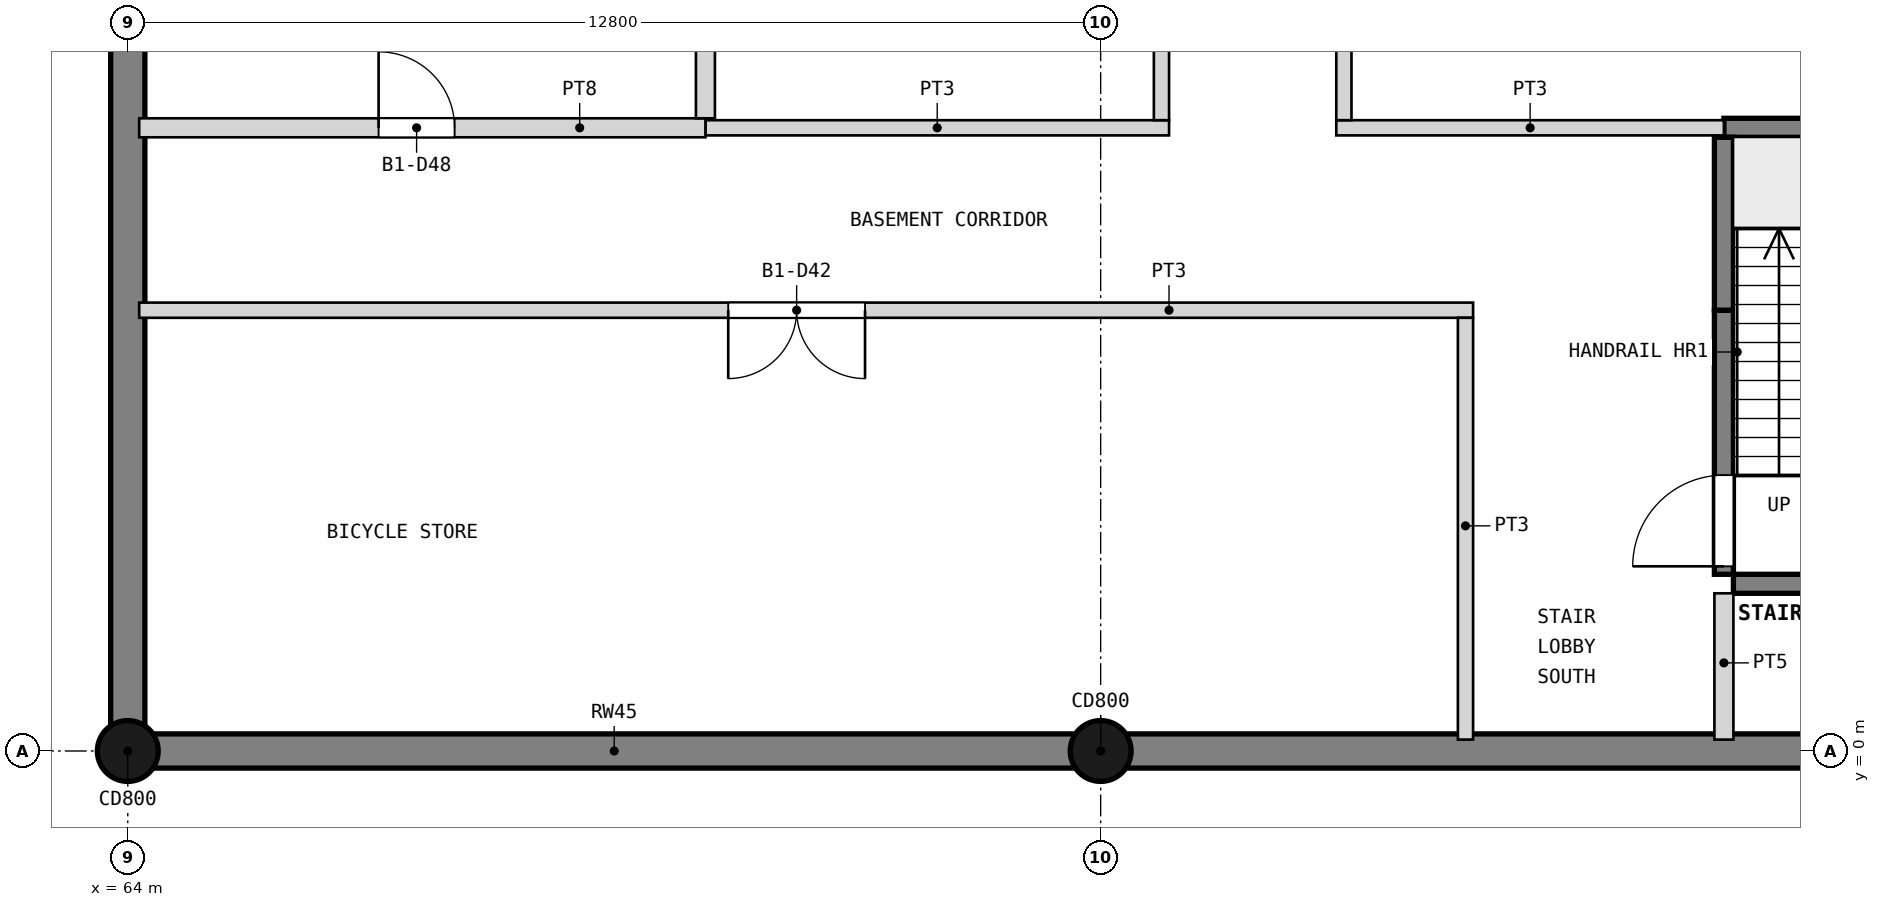
"""IFC4 building model, lengths in metres.
Left out: names, types, materials, properties, quantities, classifications, styles, units other than length and angle.
Written with IfcOpenShell. Run it as: python <this file> out.ifc"""

import sys

from ifc_helpers import new_model, si_unit, direction, frame, frame_2d, origin, origin_2d, place, context, subcontext, project, spatial, rectangle, circle, extrude, element, fill, save


model = new_model("IFC4")
c1 = context("Model", 3, precision=1e-05, world=origin(), true_north=direction((0.0, 1.0)))
c2 = subcontext(c1, "Body", "Model", "MODEL_VIEW")
j1 = project(units=[si_unit("LENGTHUNIT", "METRE"), si_unit("PLANEANGLEUNIT", "RADIAN")], contexts=[c1])
p1 = place(None, origin())
s1 = spatial("IfcSite", under=j1, at=p1, CompositionType="ELEMENT")
p2 = place(p1, origin())
s2 = spatial("IfcBuilding", under=s1, at=p2, CompositionType="ELEMENT")
p3 = place(p2, frame((0.0, 0.0, -4.8)))
s3 = spatial("IfcBuildingStorey", under=s2, at=p3, CompositionType="ELEMENT", Elevation=-4.8)
p4 = place(p3, frame((89.375, 0.0, 0.0), z_axis=(0.0, 0.0, 1.0), x_axis=(-1.0, 0.0, 0.0)))
e1 = element("IfcWall", 1, at=p4, inside=s3, PredefinedType="SOLIDWALL", context=c2, shape_type="SweptSolid", body=[
    extrude(rectangle(XDim=25.15, YDim=0.45, at=frame_2d((12.575, 0.0))), origin(), (0.0, 0.0, 1.0), 4.8),
])
p5 = place(p3, frame((64.0, -0.225, 0.0), z_axis=(0.0, 0.0, 1.0), x_axis=(0.0, 1.0, 0.0)))
e2 = element("IfcWall", 2, at=p5, inside=s3, PredefinedType="SOLIDWALL", context=c2, shape_type="SweptSolid", body=[
    extrude(rectangle(XDim=33.6, YDim=0.45, at=frame_2d((16.8, 0.0))), origin(), (0.0, 0.0, 1.0), 4.8),
])
for number, where, z_axis, x_axis in (
    (3, (76.8, 0.0, 0.0), (0.0, 0.0, 1.0), (1.0, 0.0, 0.0)),
    (4, (64.0, 0.0, 0.0), (0.0, 0.0, 1.0), (1.0, 0.0, 0.0)),
):
    element("IfcColumn", number, at=place(p3, frame(where, z_axis=z_axis, x_axis=x_axis)), inside=s3, PredefinedType="COLUMN", context=c2, shape_type="SweptSolid", body=[
        extrude(circle(Radius=0.4, at=origin_2d()), origin(), (0.0, 0.0, 1.0), 4.8),
    ])
p6 = place(p3, frame((88.725, 2.2, 0.0), z_axis=(0.0, 0.0, 1.0), x_axis=(-1.0, 0.0, 0.0)))
e5 = element("IfcWall", 5, at=p6, inside=s3, PredefinedType="SHEAR", context=c2, shape_type="SweptSolid", body=[
    extrude(rectangle(XDim=3.6, YDim=0.25, at=frame_2d((1.8, 0.0))), origin(), (0.0, 0.0, 1.0), 4.5),
])
p7 = place(p3, frame((81.7, 5.8, 0.0), z_axis=(0.0, 0.0, 1.0), x_axis=(-1.0, 0.0, 0.0)))
e6 = element("IfcWall", 6, at=p7, inside=s3, PredefinedType="PARTITIONING", context=c2, shape_type="SweptSolid", body=[
    extrude(rectangle(XDim=17.55, YDim=0.2, at=frame_2d((8.775, 0.0))), origin(), (0.0, 0.0, 1.0), 4.5),
])
p8 = place(p7, frame((8.0, 0.0, 0.0)))
e7 = element("IfcOpeningElement", 7, at=p8, cuts=e6, PredefinedType="OPENING", context=c2, shape_type="SweptSolid", body=[
    extrude(rectangle(XDim=1.8, YDim=2.1, at=frame_2d((0.9, 1.05))), frame((0.0, 0.11, 0.0), z_axis=(0.0, -1.0, 0.0), x_axis=(1.0, 0.0, 0.0)), (0.0, 0.0, 1.0), 0.22),
])
p9 = place(p3, frame((88.6, 8.2, 0.0), z_axis=(0.0, 0.0, 1.0), x_axis=(-1.0, 0.0, 0.0)))
e8 = element("IfcWall", 8, at=p9, inside=s3, PredefinedType="SHEAR", context=c2, shape_type="SweptSolid", body=[
    extrude(rectangle(XDim=3.6, YDim=0.25, at=frame_2d((1.8, 0.0))), origin(), (0.0, 0.0, 1.0), 4.5),
])
p10 = place(p3, frame((85.0, 8.2, 0.0), z_axis=(0.0, 0.0, 1.0), x_axis=(-1.0, 0.0, 0.0)))
e9 = element("IfcWall", 9, at=p10, inside=s3, PredefinedType="PARTITIONING", context=c2, shape_type="SweptSolid", body=[
    extrude(rectangle(XDim=5.1, YDim=0.2, at=frame_2d((2.55, 0.0))), origin(), (0.0, 0.0, 1.0), 4.5),
])
p11 = place(p3, frame((77.7, 8.2, 0.0), z_axis=(0.0, 0.0, 1.0), x_axis=(-1.0, 0.0, 0.0)))
e10 = element("IfcWall", 10, at=p11, inside=s3, PredefinedType="PARTITIONING", context=c2, shape_type="SweptSolid", body=[
    extrude(rectangle(XDim=6.1, YDim=0.2, at=frame_2d((3.05, 0.0))), origin(), (0.0, 0.0, 1.0), 4.5),
])
p12 = place(p3, frame((71.6, 8.2, 0.0), z_axis=(0.0, 0.0, 1.0), x_axis=(-1.0, 0.0, 0.0)))
e11 = element("IfcWall", 11, at=p12, inside=s3, PredefinedType="PARTITIONING", context=c2, shape_type="SweptSolid", body=[
    extrude(rectangle(XDim=7.45, YDim=0.25, at=frame_2d((3.725, 0.0))), origin(), (0.0, 0.0, 1.0), 4.5),
])
p13 = place(p12, frame((3.3, 0.0, 0.0)))
e12 = element("IfcOpeningElement", 12, at=p13, cuts=e11, PredefinedType="OPENING", context=c2, shape_type="SweptSolid", body=[
    extrude(rectangle(XDim=1.0, YDim=2.1, at=frame_2d((0.5, 1.05))), frame((0.0, 0.135, 0.0), z_axis=(0.0, -1.0, 0.0), x_axis=(1.0, 0.0, 0.0)), (0.0, 0.0, 1.0), 0.27),
])
p14 = place(p3, frame((85.0, 0.15, 0.0), z_axis=(0.0, 0.0, 1.0), x_axis=(0.0, 1.0, 0.0)))
e13 = element("IfcWall", 13, at=p14, inside=s3, PredefinedType="PARTITIONING", context=c2, shape_type="SweptSolid", body=[
    extrude(rectangle(XDim=1.925, YDim=0.25, at=frame_2d((0.962, 0.0))), origin(), (0.0, 0.0, 1.0), 4.5),
])
p15 = place(p3, frame((85.0, 2.325, 0.0), z_axis=(0.0, 0.0, 1.0), x_axis=(0.0, 1.0, 0.0)))
e14 = element("IfcWall", 14, at=p15, inside=s3, PredefinedType="SHEAR", context=c2, shape_type="SweptSolid", body=[
    extrude(rectangle(XDim=3.475, YDim=0.25, at=frame_2d((1.738, 0.0))), origin(), (0.0, 0.0, 1.0), 4.5),
])
p16 = place(p15, frame((0.105, 0.0, 0.0)))
e15 = element("IfcOpeningElement", 15, at=p16, cuts=e14, PredefinedType="OPENING", context=c2, shape_type="SweptSolid", body=[
    extrude(rectangle(XDim=1.2, YDim=2.1, at=frame_2d((0.6, 1.05))), frame((0.0, 0.135, 0.0), z_axis=(0.0, -1.0, 0.0), x_axis=(1.0, 0.0, 0.0)), (0.0, 0.0, 1.0), 0.27),
])
p17 = place(p3, frame((85.0, 5.8, 0.0), z_axis=(0.0, 0.0, 1.0), x_axis=(0.0, 1.0, 0.0)))
e16 = element("IfcWall", 16, at=p17, inside=s3, PredefinedType="SHEAR", context=c2, shape_type="SweptSolid", body=[
    extrude(rectangle(XDim=2.275, YDim=0.25, at=frame_2d((1.137, 0.0))), origin(), (0.0, 0.0, 1.0), 4.5),
])
p18 = place(p3, frame((81.6, 0.15, 0.0), z_axis=(0.0, 0.0, 1.0), x_axis=(0.0, 1.0, 0.0)))
e17 = element("IfcWall", 17, at=p18, inside=s3, PredefinedType="PARTITIONING", context=c2, shape_type="SweptSolid", body=[
    extrude(rectangle(XDim=5.55, YDim=0.2, at=frame_2d((2.775, 0.0))), origin(), (0.0, 0.0, 1.0), 4.5),
])
p19 = place(p3, frame((80.0, 8.3, 0.0), z_axis=(0.0, 0.0, 1.0), x_axis=(0.0, 1.0, 0.0)))
e18 = element("IfcWall", 18, at=p19, inside=s3, PredefinedType="PARTITIONING", context=c2, shape_type="SweptSolid", body=[
    extrude(rectangle(XDim=5.6, YDim=0.2, at=frame_2d((2.8, 0.0))), origin(), (0.0, 0.0, 1.0), 3.6),
])
p20 = place(p19, frame((1.8, 0.0, 0.0)))
e19 = element("IfcOpeningElement", 19, at=p20, cuts=e18, PredefinedType="OPENING", context=c2, shape_type="SweptSolid", body=[
    extrude(rectangle(XDim=1.8, YDim=2.1, at=frame_2d((0.9, 1.05))), frame((0.0, 0.11, 0.0), z_axis=(0.0, -1.0, 0.0), x_axis=(1.0, 0.0, 0.0)), (0.0, 0.0, 1.0), 0.22),
])
p21 = place(p3, frame((77.6, 8.3, 0.0), z_axis=(0.0, 0.0, 1.0), x_axis=(0.0, 1.0, 0.0)))
e20 = element("IfcWall", 20, at=p21, inside=s3, PredefinedType="PARTITIONING", context=c2, shape_type="SweptSolid", body=[
    extrude(rectangle(XDim=10.05, YDim=0.2, at=frame_2d((5.025, 0.0))), origin(), (0.0, 0.0, 1.0), 4.5),
])
p22 = place(p21, frame((4.15, 0.0, 0.0)))
e21 = element("IfcOpeningElement", 21, at=p22, cuts=e20, PredefinedType="OPENING", context=c2, shape_type="SweptSolid", body=[
    extrude(rectangle(XDim=1.1, YDim=2.1, at=frame_2d((0.55, 1.05))), frame((0.0, 0.11, 0.0), z_axis=(0.0, -1.0, 0.0), x_axis=(1.0, 0.0, 0.0)), (0.0, 0.0, 1.0), 0.22),
])
p23 = place(p3, frame((71.6, 8.325, 0.0), z_axis=(0.0, 0.0, 1.0), x_axis=(0.0, 1.0, 0.0)))
e22 = element("IfcWall", 22, at=p23, inside=s3, PredefinedType="PARTITIONING", context=c2, shape_type="SweptSolid", body=[
    extrude(rectangle(XDim=9.95, YDim=0.25, at=frame_2d((4.975, 0.0))), origin(), (0.0, 0.0, 1.0), 4.5),
])
p24 = place(p16, origin())
e23 = element("IfcDoor", 23, at=p24, inside=s3, OperationType="SINGLE_SWING_LEFT", PredefinedType="DOOR", context=c2, shape_type="SweptSolid", body=[
    extrude(rectangle(XDim=1.2, YDim=2.1, at=frame_2d((0.6, 1.05))), frame((0.0, 0.025, 0.0), z_axis=(0.0, -1.0, 0.0), x_axis=(1.0, 0.0, 0.0)), (0.0, 0.0, 1.0), 0.05),
])
fill(e15, e23)
p25 = place(p8, origin())
e24 = element("IfcDoor", 24, at=p25, inside=s3, OperationType="DOUBLE_DOOR_SINGLE_SWING", PredefinedType="DOOR", context=c2, shape_type="SweptSolid", body=[
    extrude(rectangle(XDim=1.8, YDim=2.1, at=frame_2d((0.9, 1.05))), frame((0.0, 0.025, 0.0), z_axis=(0.0, -1.0, 0.0), x_axis=(1.0, 0.0, 0.0)), (0.0, 0.0, 1.0), 0.05),
])
fill(e7, e24)
p26 = place(p13, frame((1.0, 0.0, 0.0), z_axis=(0.0, 0.0, 1.0), x_axis=(-1.0, 0.0, 0.0)))
e25 = element("IfcDoor", 25, at=p26, inside=s3, OperationType="SINGLE_SWING_LEFT", PredefinedType="DOOR", context=c2, shape_type="SweptSolid", body=[
    extrude(rectangle(XDim=1.0, YDim=2.1, at=frame_2d((0.5, 1.05))), frame((0.0, 0.025, 0.0), z_axis=(0.0, -1.0, 0.0), x_axis=(1.0, 0.0, 0.0)), (0.0, 0.0, 1.0), 0.05),
])
fill(e12, e25)
save(model, sys.argv[1])
